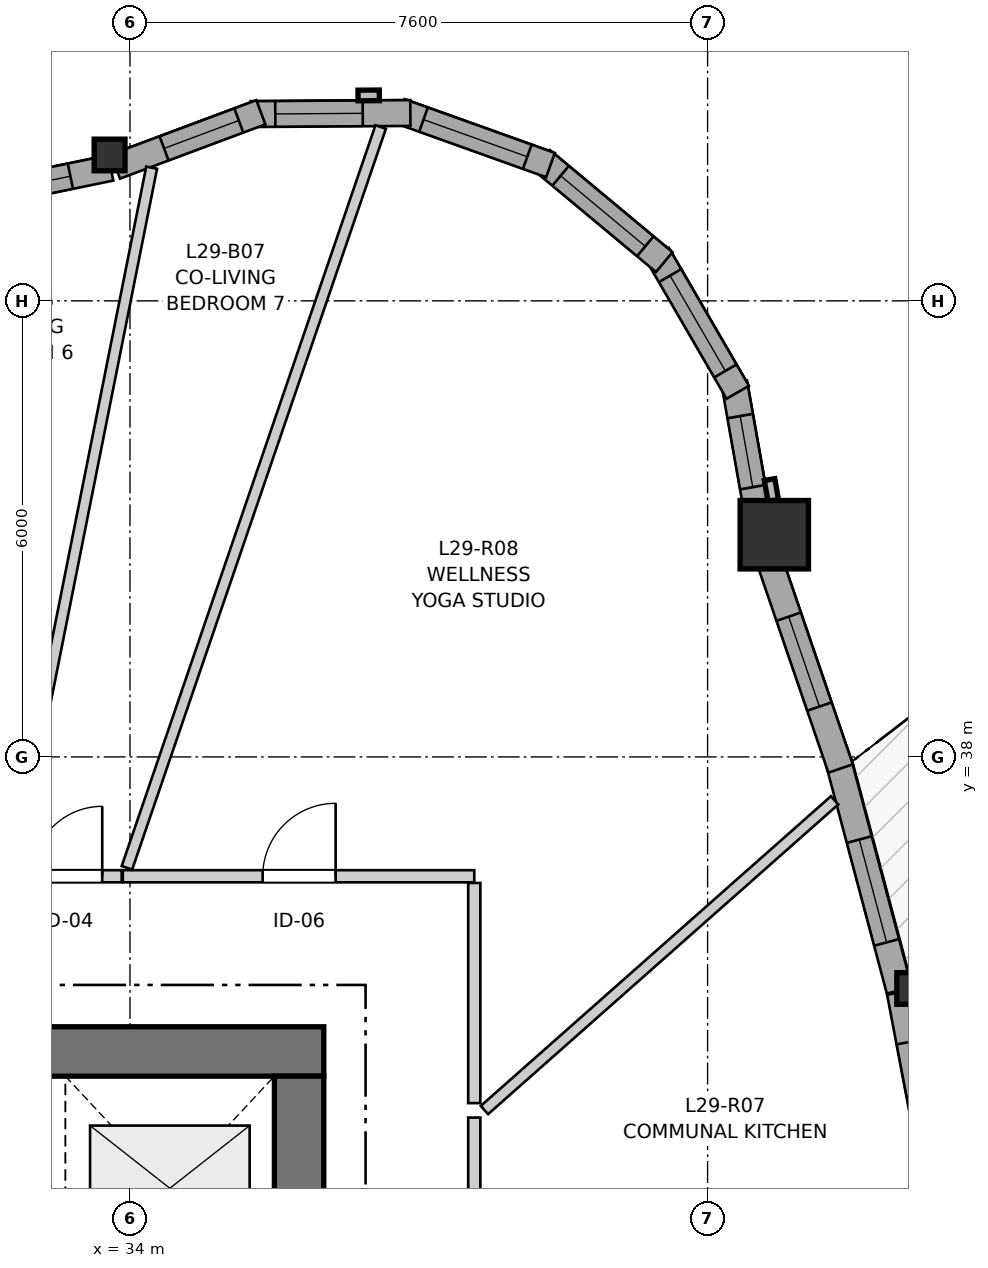
"""IFC4 building model, lengths in metres.
Left out: names, types, materials, properties, quantities, classifications, styles, units other than length and angle.
Written with IfcOpenShell. Run it as: python <this file> out.ifc"""

import sys

from ifc_helpers import new_model, si_unit, direction, frame, frame_2d, origin, origin_2d, place, context, subcontext, project, spatial, rectangle, i_section, extrude, source, transform, mapped, element, fill, save


model = new_model("IFC4")
c1 = context("Model", 3, precision=1e-05, world=origin(), true_north=direction((0.0, 1.0)))
c2 = subcontext(c1, "Body", "Model", "MODEL_VIEW")
j1 = project(units=[si_unit("LENGTHUNIT", "METRE"), si_unit("PLANEANGLEUNIT", "RADIAN")], contexts=[c1])
p1 = place(None, origin())
s1 = spatial("IfcSite", under=j1, at=p1, CompositionType="ELEMENT")
p2 = place(p1, origin())
s2 = spatial("IfcBuilding", under=s1, at=p2, CompositionType="ELEMENT")
p3 = place(p2, frame((0.0, 0.0, 99.2)))
s3 = spatial("IfcBuildingStorey", under=s2, at=p3, CompositionType="ELEMENT", Elevation=99.2)
p4 = place(p3, frame((36.55, 34.125, 0.0), z_axis=(0.0, 0.0, 1.0), x_axis=(-1.0, 0.0, 0.0)))
e1 = element("IfcWall", 1, at=p4, inside=s3, PredefinedType="SHEAR", context=c2, shape_type="SweptSolid", body=[
    extrude(rectangle(XDim=12.4, YDim=0.65, at=frame_2d((6.2, 0.0))), origin(), (0.0, 0.0, 1.0), 2.95),
])
p5 = place(p3, frame((36.225, 18.2, 0.0), z_axis=(0.0, 0.0, 1.0), x_axis=(0.0, 1.0, 0.0)))
e2 = element("IfcWall", 2, at=p5, inside=s3, PredefinedType="SHEAR", context=c2, shape_type="SweptSolid", body=[
    extrude(rectangle(XDim=15.6, YDim=0.65, at=frame_2d((7.8, 0.0))), origin(), (0.0, 0.0, 1.0), 2.95),
])
p6 = place(p5, frame((4.25, 0.0, 0.0)))
e3 = element("IfcOpeningElement", 3, at=p6, cuts=e2, PredefinedType="OPENING", context=c2, shape_type="SweptSolid", body=[
    extrude(rectangle(XDim=1.1, YDim=2.15, at=frame_2d((0.55, 1.075))), frame((0.0, 0.335, 0.0), z_axis=(0.0, -1.0, 0.0), x_axis=(1.0, 0.0, 0.0)), (0.0, 0.0, 1.0), 0.67),
])
p7 = place(p5, frame((10.25, 0.0, 0.0)))
e4 = element("IfcOpeningElement", 4, at=p7, cuts=e2, PredefinedType="OPENING", context=c2, shape_type="SweptSolid", body=[
    extrude(rectangle(XDim=1.1, YDim=2.15, at=frame_2d((0.55, 1.075))), frame((0.0, 0.335, 0.0), z_axis=(0.0, -1.0, 0.0), x_axis=(1.0, 0.0, 0.0)), (0.0, 0.0, 1.0), 0.67),
])
m1 = source(origin(), c2, "Body", "SweptSolid", [
    extrude(i_section(OverallWidth=0.406, OverallDepth=0.416, WebThickness=0.027, FlangeThickness=0.044, FilletRadius=0.015, at=origin_2d()), origin(), (0.0, 0.0, 1.0), 2.95),
])
p8 = place(p3, frame((44.292, 34.954, 0.0), z_axis=(0.0, 0.0, 1.0), x_axis=(1.0, 0.0, 0.0)))
e5 = element("IfcColumn", 5, at=p8, inside=s3, PredefinedType="PILASTER", context=c2, shape_type="MappedRepresentation", body=[
    mapped(m1, transform((0.0, 0.0, 0.0), x_axis=(1.0, 0.0, 0.0), y_axis=(0.0, 1.0, 0.0), z_axis=(0.0, 0.0, 1.0), scale=1.0)),
])
m2 = source(origin(), c2, "Body", "SweptSolid", [
    extrude(rectangle(XDim=0.9, YDim=0.9, at=origin_2d()), origin(), (0.0, 0.0, 1.0), 2.95),
])
p9 = place(p3, frame((42.478, 40.923, 0.0), z_axis=(0.0, 0.0, 1.0), x_axis=(1.0, 0.0, 0.0)))
e6 = element("IfcColumn", 6, at=p9, inside=s3, PredefinedType="COLUMN", context=c2, shape_type="MappedRepresentation", body=[
    mapped(m2, transform((0.0, 0.0, 0.0), x_axis=(1.0, 0.0, 0.0), y_axis=(0.0, 1.0, 0.0), z_axis=(0.0, 0.0, 1.0), scale=1.0)),
])
p10 = place(p3, frame((33.732, 45.92, 0.0), z_axis=(0.0, 0.0, 1.0), x_axis=(1.0, 0.0, 0.0)))
e7 = element("IfcColumn", 7, at=p10, inside=s3, PredefinedType="PILASTER", context=c2, shape_type="MappedRepresentation", body=[
    mapped(m1, transform((0.0, 0.0, 0.0), x_axis=(1.0, 0.0, 0.0), y_axis=(0.0, 1.0, 0.0), z_axis=(0.0, 0.0, 1.0), scale=1.0)),
])
p11 = place(p3, frame((44.699, 31.9, 0.0), z_axis=(0.0, 0.0, 1.0), x_axis=(-0.186689944156, 0.982418884566, 0.0)))
e8 = element("IfcWall", 8, at=p11, inside=s3, PredefinedType="SOLIDWALL", context=c2, shape_type="SweptSolid", body=[
    extrude(rectangle(XDim=3.056, YDim=0.34, at=frame_2d((1.528, 0.0))), origin(), (0.0, 0.0, 1.0), 2.48),
])
p12 = place(p11, frame((0.791, 0.0, 0.82)))
e9 = element("IfcOpeningElement", 9, at=p12, cuts=e8, PredefinedType="OPENING", context=c2, shape_type="SweptSolid", body=[
    extrude(rectangle(XDim=1.6, YDim=1.35, at=frame_2d((0.8, 0.675))), frame((0.0, 0.18, 0.0), z_axis=(0.0, -1.0, 0.0), x_axis=(1.0, 0.0, 0.0)), (0.0, 0.0, 1.0), 0.36),
])
p13 = place(p3, frame((44.123, 34.93, 0.0), z_axis=(0.0, 0.0, 1.0), x_axis=(-0.257080487516, 0.96638999526, 0.0)))
e10 = element("IfcWall", 10, at=p13, inside=s3, PredefinedType="SOLIDWALL", context=c2, shape_type="SweptSolid", body=[
    extrude(rectangle(XDim=3.106, YDim=0.34, at=frame_2d((1.553, 0.0))), origin(), (0.0, 0.0, 1.0), 2.48),
])
p14 = place(p13, frame((0.652, 0.0, 0.82)))
e11 = element("IfcOpeningElement", 11, at=p14, cuts=e10, PredefinedType="OPENING", context=c2, shape_type="SweptSolid", body=[
    extrude(rectangle(XDim=1.4, YDim=1.35, at=frame_2d((0.7, 0.675))), frame((0.0, 0.18, 0.0), z_axis=(0.0, -1.0, 0.0), x_axis=(1.0, 0.0, 0.0)), (0.0, 0.0, 1.0), 0.36),
])
p15 = place(p3, frame((43.35, 37.848, 0.0), z_axis=(0.0, 0.0, 1.0), x_axis=(-0.323561473353, 0.946207151189, 0.0)))
e12 = element("IfcWall", 12, at=p15, inside=s3, PredefinedType="SOLIDWALL", context=c2, shape_type="SweptSolid", body=[
    extrude(rectangle(XDim=2.962, YDim=0.34, at=frame_2d((1.481, 0.0))), origin(), (0.0, 0.0, 1.0), 2.48),
])
p16 = place(p15, frame((0.861, 0.0, 0.82)))
e13 = element("IfcOpeningElement", 13, at=p16, cuts=e12, PredefinedType="OPENING", context=c2, shape_type="SweptSolid", body=[
    extrude(rectangle(XDim=1.25, YDim=1.35, at=frame_2d((0.625, 0.675))), frame((0.0, 0.18, 0.0), z_axis=(0.0, -1.0, 0.0), x_axis=(1.0, 0.0, 0.0)), (0.0, 0.0, 1.0), 0.36),
])
p17 = place(p3, frame((42.27, 41.12, 0.0), z_axis=(0.0, 0.0, 1.0), x_axis=(-0.17440141227, 0.984674640375, 0.0)))
e14 = element("IfcWall", 14, at=p17, inside=s3, PredefinedType="SOLIDWALL", context=c2, shape_type="SweptSolid", body=[
    extrude(rectangle(XDim=1.831, YDim=0.34, at=frame_2d((0.916, 0.0))), origin(), (0.0, 0.0, 1.0), 2.48),
])
p18 = place(p17, frame((0.436, 0.0, 0.82)))
e15 = element("IfcOpeningElement", 15, at=p18, cuts=e14, PredefinedType="OPENING", context=c2, shape_type="SweptSolid", body=[
    extrude(rectangle(XDim=0.95, YDim=1.35, at=frame_2d((0.475, 0.675))), frame((0.0, 0.18, 0.0), z_axis=(0.0, -1.0, 0.0), x_axis=(1.0, 0.0, 0.0)), (0.0, 0.0, 1.0), 0.36),
])
p19 = place(p3, frame((41.997, 42.797, 0.0), z_axis=(0.0, 0.0, 1.0), x_axis=(-0.501902596059, 0.864924149315, 0.0)))
e16 = element("IfcWall", 16, at=p19, inside=s3, PredefinedType="SOLIDWALL", context=c2, shape_type="SweptSolid", body=[
    extrude(rectangle(XDim=2.099, YDim=0.34, at=frame_2d((1.049, 0.0))), origin(), (0.0, 0.0, 1.0), 2.48),
])
p20 = place(p19, frame((0.324, 0.0, 0.82)))
e17 = element("IfcOpeningElement", 17, at=p20, cuts=e16, PredefinedType="OPENING", context=c2, shape_type="SweptSolid", body=[
    extrude(rectangle(XDim=1.45, YDim=1.25, at=frame_2d((0.725, 0.625))), frame((0.0, 0.18, 0.0), z_axis=(0.0, -1.0, 0.0), x_axis=(1.0, 0.0, 0.0)), (0.0, 0.0, 1.0), 0.36),
])
p21 = place(p3, frame((41.03, 44.51, 0.0), z_axis=(0.0, 0.0, 1.0), x_axis=(-0.768497696041, 0.639852554249, 0.0)))
e18 = element("IfcWall", 18, at=p21, inside=s3, PredefinedType="SOLIDWALL", context=c2, shape_type="SweptSolid", body=[
    extrude(rectangle(XDim=2.099, YDim=0.34, at=frame_2d((1.049, 0.0))), origin(), (0.0, 0.0, 1.0), 2.48),
])
p22 = place(p21, frame((0.324, 0.0, 0.82)))
e19 = element("IfcOpeningElement", 19, at=p22, cuts=e18, PredefinedType="OPENING", context=c2, shape_type="SweptSolid", body=[
    extrude(rectangle(XDim=1.45, YDim=1.25, at=frame_2d((0.725, 0.625))), frame((0.0, 0.18, 0.0), z_axis=(0.0, -1.0, 0.0), x_axis=(1.0, 0.0, 0.0)), (0.0, 0.0, 1.0), 0.36),
])
p23 = place(p3, frame((39.533, 45.787, 0.0), z_axis=(0.0, 0.0, 1.0), x_axis=(-0.941523304278, 0.336947870598, 0.0)))
e20 = element("IfcWall", 20, at=p23, inside=s3, PredefinedType="SOLIDWALL", context=c2, shape_type="SweptSolid", body=[
    extrude(rectangle(XDim=2.099, YDim=0.34, at=frame_2d((1.05, 0.0))), origin(), (0.0, 0.0, 1.0), 2.48),
])
p24 = place(p23, frame((0.324, 0.0, 0.82)))
e21 = element("IfcOpeningElement", 21, at=p24, cuts=e20, PredefinedType="OPENING", context=c2, shape_type="SweptSolid", body=[
    extrude(rectangle(XDim=1.45, YDim=1.25, at=frame_2d((0.725, 0.625))), frame((0.0, 0.18, 0.0), z_axis=(0.0, -1.0, 0.0), x_axis=(1.0, 0.0, 0.0)), (0.0, 0.0, 1.0), 0.36),
])
p25 = place(p3, frame((37.689, 46.471, 0.0), z_axis=(0.0, 0.0, 1.0), x_axis=(-0.999976456891, -0.00686189939, 0.0)))
e22 = element("IfcWall", 22, at=p25, inside=s3, PredefinedType="SOLIDWALL", context=c2, shape_type="SweptSolid", body=[
    extrude(rectangle(XDim=2.099, YDim=0.34, at=frame_2d((1.05, 0.0))), origin(), (0.0, 0.0, 1.0), 2.48),
])
p26 = place(p25, frame((0.627, 0.0, 0.82)))
e23 = element("IfcOpeningElement", 23, at=p26, cuts=e22, PredefinedType="OPENING", context=c2, shape_type="SweptSolid", body=[
    extrude(rectangle(XDim=1.15, YDim=1.2, at=frame_2d((0.575, 0.6))), frame((0.0, 0.18, 0.0), z_axis=(0.0, -1.0, 0.0), x_axis=(1.0, 0.0, 0.0)), (0.0, 0.0, 1.0), 0.36),
])
p27 = place(p3, frame((35.722, 46.481, 0.0), z_axis=(0.0, 0.0, 1.0), x_axis=(-0.9368002254, -0.349864741994, 0.0)))
e24 = element("IfcWall", 24, at=p27, inside=s3, PredefinedType="SOLIDWALL", context=c2, shape_type="SweptSolid", body=[
    extrude(rectangle(XDim=2.041, YDim=0.34, at=frame_2d((1.021, 0.0))), origin(), (0.0, 0.0, 1.0), 2.48),
])
p28 = place(p27, frame((0.309, 0.0, 0.82)))
e25 = element("IfcOpeningElement", 25, at=p28, cuts=e24, PredefinedType="OPENING", context=c2, shape_type="SweptSolid", body=[
    extrude(rectangle(XDim=1.05, YDim=1.45, at=frame_2d((0.525, 0.725))), frame((0.0, 0.18, 0.0), z_axis=(0.0, -1.0, 0.0), x_axis=(1.0, 0.0, 0.0)), (0.0, 0.0, 1.0), 0.36),
])
p29 = place(p3, frame((33.747, 45.749, 0.0), z_axis=(0.0, 0.0, 1.0), x_axis=(-0.979440240026, -0.201734519153, 0.0)))
e26 = element("IfcWall", 26, at=p29, inside=s3, PredefinedType="SOLIDWALL", context=c2, shape_type="SweptSolid", body=[
    extrude(rectangle(XDim=3.124, YDim=0.34, at=frame_2d((1.562, 0.0))), origin(), (0.0, 0.0, 1.0), 2.48),
])
p30 = place(p29, frame((0.541, 0.0, 0.82)))
e27 = element("IfcOpeningElement", 27, at=p30, cuts=e26, PredefinedType="OPENING", context=c2, shape_type="SweptSolid", body=[
    extrude(rectangle(XDim=1.65, YDim=1.45, at=frame_2d((0.825, 0.725))), frame((0.0, 0.18, 0.0), z_axis=(0.0, -1.0, 0.0), x_axis=(1.0, 0.0, 0.0)), (0.0, 0.0, 1.0), 0.36),
])
p31 = place(p3, frame((33.906, 36.43, 0.0), z_axis=(0.0, 0.0, 1.0), x_axis=(1.0, 0.0, 0.0)))
e28 = element("IfcWall", 28, at=p31, inside=s3, PredefinedType="PARTITIONING", context=c2, shape_type="SweptSolid", body=[
    extrude(rectangle(XDim=4.624, YDim=0.16, at=frame_2d((2.312, 0.0))), origin(), (0.0, 0.0, 1.0), 2.588),
])
p32 = place(p31, frame((1.84, 0.0, 0.0)))
e29 = element("IfcOpeningElement", 29, at=p32, cuts=e28, PredefinedType="OPENING", context=c2, shape_type="SweptSolid", body=[
    extrude(rectangle(XDim=0.96, YDim=2.1, at=frame_2d((0.48, 1.05))), frame((0.0, 0.09, 0.0), z_axis=(0.0, -1.0, 0.0), x_axis=(1.0, 0.0, 0.0)), (0.0, 0.0, 1.0), 0.18),
])
p33 = place(p3, frame((38.53, 33.255, 0.0), z_axis=(0.0, 0.0, 1.0), x_axis=(0.0, -1.0, 0.0)))
e30 = element("IfcWall", 30, at=p33, inside=s3, PredefinedType="PARTITIONING", context=c2, shape_type="SweptSolid", body=[
    extrude(rectangle(XDim=3.726, YDim=0.16, at=frame_2d((1.863, 0.0))), origin(), (0.0, 0.0, 1.0), 2.95),
])
p34 = place(p33, frame((1.239, 0.0, 0.0)))
e31 = element("IfcOpeningElement", 31, at=p34, cuts=e30, PredefinedType="OPENING", context=c2, shape_type="SweptSolid", body=[
    extrude(rectangle(XDim=1.3, YDim=2.1, at=frame_2d((0.65, 1.05))), frame((0.0, 0.09, 0.0), z_axis=(0.0, -1.0, 0.0), x_axis=(1.0, 0.0, 0.0)), (0.0, 0.0, 1.0), 0.18),
])
p35 = place(p3, frame((32.458, 36.43, 0.0), z_axis=(0.0, 0.0, 1.0), x_axis=(1.0, 0.0, 0.0)))
e32 = element("IfcWall", 32, at=p35, inside=s3, PredefinedType="PARTITIONING", context=c2, shape_type="SweptSolid", body=[
    extrude(rectangle(XDim=1.433, YDim=0.16, at=frame_2d((0.717, 0.0))), origin(), (0.0, 0.0, 1.0), 2.95),
])
p36 = place(p35, frame((0.257, 0.0, 0.0)))
e33 = element("IfcOpeningElement", 33, at=p36, cuts=e32, PredefinedType="OPENING", context=c2, shape_type="SweptSolid", body=[
    extrude(rectangle(XDim=0.92, YDim=2.1, at=frame_2d((0.46, 1.05))), frame((0.0, 0.09, 0.0), z_axis=(0.0, -1.0, 0.0), x_axis=(1.0, 0.0, 0.0)), (0.0, 0.0, 1.0), 0.18),
])
p37 = place(p3, frame((33.96, 36.541, 0.0), z_axis=(0.0, 0.0, 1.0), x_axis=(0.324058346196, 0.946037096662, 0.0)))
e34 = element("IfcWall", 34, at=p37, inside=s3, PredefinedType="PARTITIONING", context=c2, shape_type="SweptSolid", body=[
    extrude(rectangle(XDim=10.302, YDim=0.145, at=frame_2d((5.151, 0.0))), origin(), (0.0, 0.0, 1.0), 2.95),
])
p38 = place(p3, frame((32.448, 36.532, 0.0), z_axis=(0.0, 0.0, 1.0), x_axis=(0.195406965811, 0.980722242897, 0.0)))
e35 = element("IfcWall", 35, at=p38, inside=s3, PredefinedType="PARTITIONING", context=c2, shape_type="SweptSolid", body=[
    extrude(rectangle(XDim=9.402, YDim=0.145, at=frame_2d((4.701, 0.0))), origin(), (0.0, 0.0, 1.0), 2.95),
])
p39 = place(p3, frame((38.664, 33.354, 0.0), z_axis=(0.0, 0.0, 1.0), x_axis=(0.749069296105, 0.662491652501, 0.0)))
e36 = element("IfcWall", 36, at=p39, inside=s3, PredefinedType="PARTITIONING", context=c2, shape_type="SweptSolid", body=[
    extrude(rectangle(XDim=6.15, YDim=0.145, at=frame_2d((3.075, 0.0))), origin(), (0.0, 0.0, 1.0), 2.95),
])
p40 = place(p3, frame((38.53, 33.446, 0.0), z_axis=(0.0, 0.0, 1.0), x_axis=(0.0, 1.0, 0.0)))
e37 = element("IfcWall", 37, at=p40, inside=s3, PredefinedType="PARTITIONING", context=c2, shape_type="SweptSolid", body=[
    extrude(rectangle(XDim=2.896, YDim=0.16, at=frame_2d((1.448, 0.0))), origin(), (0.0, 0.0, 1.0), 2.588),
])
m3 = source(origin(), c2, "Body", "SweptSolid", [
    extrude(rectangle(XDim=1.6, YDim=1.35, at=frame_2d((0.8, 0.675))), frame((0.0, 0.03, 0.0), z_axis=(0.0, -1.0, 0.0), x_axis=(1.0, 0.0, 0.0)), (0.0, 0.0, 1.0), 0.06),
])
p41 = place(p12, origin())
e38 = element("IfcWindow", 38, at=p41, inside=s3, PartitioningType="SINGLE_PANEL", PredefinedType="WINDOW", context=c2, shape_type="MappedRepresentation", body=[
    mapped(m3, transform((0.0, 0.0, 0.0), x_axis=(1.0, 0.0, 0.0), y_axis=(0.0, 1.0, 0.0), z_axis=(0.0, 0.0, 1.0), scale=1.0)),
])
fill(e9, e38)
m4 = source(origin(), c2, "Body", "SweptSolid", [
    extrude(rectangle(XDim=1.4, YDim=1.35, at=frame_2d((0.7, 0.675))), frame((0.0, 0.03, 0.0), z_axis=(0.0, -1.0, 0.0), x_axis=(1.0, 0.0, 0.0)), (0.0, 0.0, 1.0), 0.06),
])
p42 = place(p14, origin())
e39 = element("IfcWindow", 39, at=p42, inside=s3, PartitioningType="SINGLE_PANEL", PredefinedType="WINDOW", context=c2, shape_type="MappedRepresentation", body=[
    mapped(m4, transform((0.0, 0.0, 0.0), x_axis=(1.0, 0.0, 0.0), y_axis=(0.0, 1.0, 0.0), z_axis=(0.0, 0.0, 1.0), scale=1.0)),
])
fill(e11, e39)
m5 = source(origin(), c2, "Body", "SweptSolid", [
    extrude(rectangle(XDim=1.25, YDim=1.35, at=frame_2d((0.625, 0.675))), frame((0.0, 0.03, 0.0), z_axis=(0.0, -1.0, 0.0), x_axis=(1.0, 0.0, 0.0)), (0.0, 0.0, 1.0), 0.06),
])
p43 = place(p16, origin())
e40 = element("IfcWindow", 40, at=p43, inside=s3, PartitioningType="SINGLE_PANEL", PredefinedType="WINDOW", context=c2, shape_type="MappedRepresentation", body=[
    mapped(m5, transform((0.0, 0.0, 0.0), x_axis=(1.0, 0.0, 0.0), y_axis=(0.0, 1.0, 0.0), z_axis=(0.0, 0.0, 1.0), scale=1.0)),
])
fill(e13, e40)
m6 = source(origin(), c2, "Body", "SweptSolid", [
    extrude(rectangle(XDim=0.95, YDim=1.35, at=frame_2d((0.475, 0.675))), frame((0.0, 0.03, 0.0), z_axis=(0.0, -1.0, 0.0), x_axis=(1.0, 0.0, 0.0)), (0.0, 0.0, 1.0), 0.06),
])
p44 = place(p18, origin())
e41 = element("IfcWindow", 41, at=p44, inside=s3, PartitioningType="SINGLE_PANEL", PredefinedType="WINDOW", context=c2, shape_type="MappedRepresentation", body=[
    mapped(m6, transform((0.0, 0.0, 0.0), x_axis=(1.0, 0.0, 0.0), y_axis=(0.0, 1.0, 0.0), z_axis=(0.0, 0.0, 1.0), scale=1.0)),
])
fill(e15, e41)
m7 = source(origin(), c2, "Body", "SweptSolid", [
    extrude(rectangle(XDim=1.45, YDim=1.25, at=frame_2d((0.725, 0.625))), frame((0.0, 0.03, 0.0), z_axis=(0.0, -1.0, 0.0), x_axis=(1.0, 0.0, 0.0)), (0.0, 0.0, 1.0), 0.06),
])
p45 = place(p20, origin())
e42 = element("IfcWindow", 42, at=p45, inside=s3, PartitioningType="SINGLE_PANEL", PredefinedType="WINDOW", context=c2, shape_type="MappedRepresentation", body=[
    mapped(m7, transform((0.0, 0.0, 0.0), x_axis=(1.0, 0.0, 0.0), y_axis=(0.0, 1.0, 0.0), z_axis=(0.0, 0.0, 1.0), scale=1.0)),
])
fill(e17, e42)
p46 = place(p22, origin())
e43 = element("IfcWindow", 43, at=p46, inside=s3, PartitioningType="SINGLE_PANEL", PredefinedType="WINDOW", context=c2, shape_type="MappedRepresentation", body=[
    mapped(m7, transform((0.0, 0.0, 0.0), x_axis=(1.0, 0.0, 0.0), y_axis=(0.0, 1.0, 0.0), z_axis=(0.0, 0.0, 1.0), scale=1.0)),
])
fill(e19, e43)
p47 = place(p24, origin())
e44 = element("IfcWindow", 44, at=p47, inside=s3, PartitioningType="SINGLE_PANEL", PredefinedType="WINDOW", context=c2, shape_type="MappedRepresentation", body=[
    mapped(m7, transform((0.0, 0.0, 0.0), x_axis=(1.0, 0.0, 0.0), y_axis=(0.0, 1.0, 0.0), z_axis=(0.0, 0.0, 1.0), scale=1.0)),
])
fill(e21, e44)
m8 = source(origin(), c2, "Body", "SweptSolid", [
    extrude(rectangle(XDim=1.15, YDim=1.2, at=frame_2d((0.575, 0.6))), frame((0.0, 0.03, 0.0), z_axis=(0.0, -1.0, 0.0), x_axis=(1.0, 0.0, 0.0)), (0.0, 0.0, 1.0), 0.06),
])
p48 = place(p26, origin())
e45 = element("IfcWindow", 45, at=p48, inside=s3, PartitioningType="SINGLE_PANEL", PredefinedType="WINDOW", context=c2, shape_type="MappedRepresentation", body=[
    mapped(m8, transform((0.0, 0.0, 0.0), x_axis=(1.0, 0.0, 0.0), y_axis=(0.0, 1.0, 0.0), z_axis=(0.0, 0.0, 1.0), scale=1.0)),
])
fill(e23, e45)
m9 = source(origin(), c2, "Body", "SweptSolid", [
    extrude(rectangle(XDim=1.05, YDim=1.45, at=frame_2d((0.525, 0.725))), frame((0.0, 0.03, 0.0), z_axis=(0.0, -1.0, 0.0), x_axis=(1.0, 0.0, 0.0)), (0.0, 0.0, 1.0), 0.06),
])
p49 = place(p28, origin())
e46 = element("IfcWindow", 46, at=p49, inside=s3, PartitioningType="SINGLE_PANEL", PredefinedType="WINDOW", context=c2, shape_type="MappedRepresentation", body=[
    mapped(m9, transform((0.0, 0.0, 0.0), x_axis=(1.0, 0.0, 0.0), y_axis=(0.0, 1.0, 0.0), z_axis=(0.0, 0.0, 1.0), scale=1.0)),
])
fill(e25, e46)
m10 = source(origin(), c2, "Body", "SweptSolid", [
    extrude(rectangle(XDim=1.65, YDim=1.45, at=frame_2d((0.825, 0.725))), frame((0.0, 0.03, 0.0), z_axis=(0.0, -1.0, 0.0), x_axis=(1.0, 0.0, 0.0)), (0.0, 0.0, 1.0), 0.06),
])
p50 = place(p30, origin())
e47 = element("IfcWindow", 47, at=p50, inside=s3, PartitioningType="SINGLE_PANEL", PredefinedType="WINDOW", context=c2, shape_type="MappedRepresentation", body=[
    mapped(m10, transform((0.0, 0.0, 0.0), x_axis=(1.0, 0.0, 0.0), y_axis=(0.0, 1.0, 0.0), z_axis=(0.0, 0.0, 1.0), scale=1.0)),
])
fill(e27, e47)
m11 = source(origin(), c2, "Body", "SweptSolid", [
    extrude(rectangle(XDim=0.96, YDim=2.1, at=frame_2d((0.48, 1.05))), frame((0.0, 0.025, 0.0), z_axis=(0.0, -1.0, 0.0), x_axis=(1.0, 0.0, 0.0)), (0.0, 0.0, 1.0), 0.05),
])
p51 = place(p32, origin())
e48 = element("IfcDoor", 48, at=p51, inside=s3, OperationType="SINGLE_SWING_RIGHT", PredefinedType="DOOR", context=c2, shape_type="MappedRepresentation", body=[
    mapped(m11, transform((0.0, 0.0, 0.0), x_axis=(1.0, 0.0, 0.0), y_axis=(0.0, 1.0, 0.0), z_axis=(0.0, 0.0, 1.0), scale=1.0)),
])
fill(e29, e48)
m12 = source(origin(), c2, "Body", "SweptSolid", [
    extrude(rectangle(XDim=0.92, YDim=2.1, at=frame_2d((0.46, 1.05))), frame((0.0, 0.025, 0.0), z_axis=(0.0, -1.0, 0.0), x_axis=(1.0, 0.0, 0.0)), (0.0, 0.0, 1.0), 0.05),
])
p52 = place(p36, origin())
e49 = element("IfcDoor", 49, at=p52, inside=s3, OperationType="SINGLE_SWING_RIGHT", PredefinedType="DOOR", context=c2, shape_type="MappedRepresentation", body=[
    mapped(m12, transform((0.0, 0.0, 0.0), x_axis=(1.0, 0.0, 0.0), y_axis=(0.0, 1.0, 0.0), z_axis=(0.0, 0.0, 1.0), scale=1.0)),
])
fill(e33, e49)
save(model, sys.argv[1])
